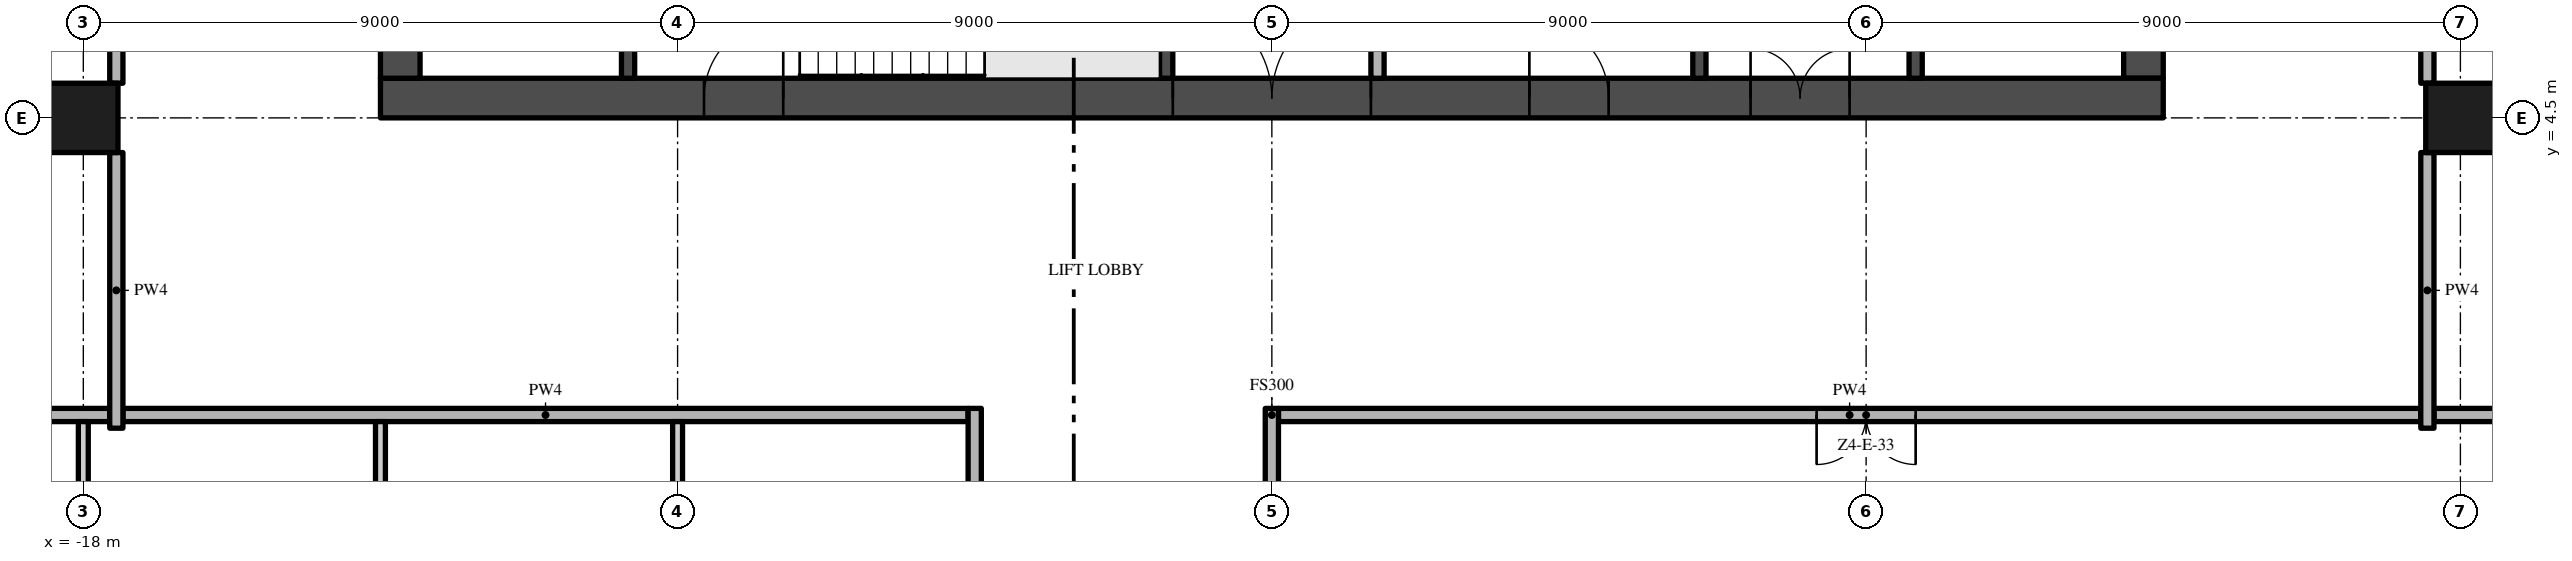
"""IFC4 building model, lengths in metres.
Left out: names, types, materials, properties, quantities, classifications, styles, units other than length and angle.
Written with IfcOpenShell. Run it as: python <this file> out.ifc"""

import sys

from ifc_helpers import new_model, si_unit, direction, frame, frame_2d, origin, origin_2d, place, context, subcontext, project, spatial, rectangle, extrude, element, fill, save


model = new_model("IFC4")
c1 = context("Model", 3, precision=1e-05, world=origin(), true_north=direction((0.0, 1.0)))
c2 = subcontext(c1, "Body", "Model", "MODEL_VIEW")
j1 = project(units=[si_unit("LENGTHUNIT", "METRE"), si_unit("PLANEANGLEUNIT", "RADIAN")], contexts=[c1])
p1 = place(None, origin())
s1 = spatial("IfcSite", under=j1, at=p1, CompositionType="ELEMENT")
p2 = place(p1, origin())
s2 = spatial("IfcBuilding", under=s1, at=p2, CompositionType="ELEMENT")
p3 = place(p2, frame((0.0, 0.0, 230.0)))
s3 = spatial("IfcBuildingStorey", under=s2, at=p3, CompositionType="ELEMENT", Elevation=230.0)
p4 = place(p3, frame((-13.5, 4.8, -0.3), z_axis=(0.0, 0.0, 1.0), x_axis=(1.0, 0.0, 0.0)))
e1 = element("IfcWall", 1, at=p4, inside=s3, PredefinedType="SHEAR", context=c2, shape_type="SweptSolid", body=[
    extrude(rectangle(XDim=27.0, YDim=0.6, at=frame_2d((13.5, 0.0))), origin(), (0.0, 0.0, 1.0), 3.8),
])
p5 = place(p4, frame((12.0, 0.0, 0.3)))
e2 = element("IfcOpeningElement", 2, at=p5, cuts=e1, PredefinedType="OPENING", context=c2, shape_type="SweptSolid", body=[
    extrude(rectangle(XDim=3.0, YDim=2.4, at=frame_2d((1.5, 1.2))), frame((0.0, 0.31, 0.0), z_axis=(0.0, -1.0, 0.0), x_axis=(1.0, 0.0, 0.0)), (0.0, 0.0, 1.0), 0.62),
])
p6 = place(p4, frame((4.9, 0.0, 0.3)))
e3 = element("IfcOpeningElement", 3, at=p6, cuts=e1, PredefinedType="OPENING", context=c2, shape_type="SweptSolid", body=[
    extrude(rectangle(XDim=1.2, YDim=2.2, at=frame_2d((0.6, 1.1))), frame((0.0, 0.31, 0.0), z_axis=(0.0, -1.0, 0.0), x_axis=(1.0, 0.0, 0.0)), (0.0, 0.0, 1.0), 0.62),
])
p7 = place(p4, frame((20.75, 0.0, 0.3)))
e4 = element("IfcOpeningElement", 4, at=p7, cuts=e1, PredefinedType="OPENING", context=c2, shape_type="SweptSolid", body=[
    extrude(rectangle(XDim=1.5, YDim=2.2, at=frame_2d((0.75, 1.1))), frame((0.0, 0.31, 0.0), z_axis=(0.0, -1.0, 0.0), x_axis=(1.0, 0.0, 0.0)), (0.0, 0.0, 1.0), 0.62),
])
p8 = place(p4, frame((17.4, 0.0, 0.3)))
e5 = element("IfcOpeningElement", 5, at=p8, cuts=e1, PredefinedType="OPENING", context=c2, shape_type="SweptSolid", body=[
    extrude(rectangle(XDim=1.2, YDim=2.2, at=frame_2d((0.6, 1.1))), frame((0.0, 0.31, 0.0), z_axis=(0.0, -1.0, 0.0), x_axis=(1.0, 0.0, 0.0)), (0.0, 0.0, 1.0), 0.62),
])
p9 = place(p3, frame((13.2, 5.1, -0.3), z_axis=(0.0, 0.0, 1.0), x_axis=(0.0, 1.0, 0.0)))
e6 = element("IfcWall", 6, at=p9, inside=s3, PredefinedType="SHEAR", context=c2, shape_type="SweptSolid", body=[
    extrude(rectangle(XDim=16.8, YDim=0.6, at=frame_2d((8.4, 0.0))), origin(), (0.0, 0.0, 1.0), 3.8),
])
p10 = place(p9, frame((6.3, 0.0, 0.3)))
e7 = element("IfcOpeningElement", 7, at=p10, cuts=e6, PredefinedType="OPENING", context=c2, shape_type="SweptSolid", body=[
    extrude(rectangle(XDim=1.2, YDim=2.2, at=frame_2d((0.6, 1.1))), frame((0.0, 0.31, 0.0), z_axis=(0.0, -1.0, 0.0), x_axis=(1.0, 0.0, 0.0)), (0.0, 0.0, 1.0), 0.62),
])
p11 = place(p3, frame((-13.2, 21.9, -0.3), z_axis=(0.0, 0.0, 1.0), x_axis=(0.0, -1.0, 0.0)))
e8 = element("IfcWall", 8, at=p11, inside=s3, PredefinedType="SHEAR", context=c2, shape_type="SweptSolid", body=[
    extrude(rectangle(XDim=16.8, YDim=0.6, at=frame_2d((8.4, 0.0))), origin(), (0.0, 0.0, 1.0), 3.8),
])
p12 = place(p11, frame((9.3, 0.0, 0.3)))
e9 = element("IfcOpeningElement", 9, at=p12, cuts=e8, PredefinedType="OPENING", context=c2, shape_type="SweptSolid", body=[
    extrude(rectangle(XDim=1.2, YDim=2.2, at=frame_2d((0.6, 1.1))), frame((0.0, 0.31, 0.0), z_axis=(0.0, -1.0, 0.0), x_axis=(1.0, 0.0, 0.0)), (0.0, 0.0, 1.0), 0.62),
])
for number, where, z_axis, x_axis in (
    (10, (-18.0, 4.5, 0.0), (0.0, 0.0, 1.0), (1.0, 0.0, 0.0)),
    (11, (18.0, 4.5, 0.0), (0.0, 0.0, 1.0), (1.0, 0.0, 0.0)),
):
    element("IfcColumn", number, at=place(p3, frame(where, z_axis=z_axis, x_axis=x_axis)), inside=s3, PredefinedType="COLUMN", context=c2, shape_type="SweptSolid", body=[
        extrude(rectangle(XDim=1.05, YDim=1.05, at=origin_2d()), origin(), (0.0, 0.0, 1.0), 3.5),
    ])
for number, where, z_axis, x_axis in (
    (12, (-9.75, 5.1, 0.0), (0.0, 0.0, 1.0), (0.0, 1.0, 0.0)),
    (13, (-1.6, 5.1, 0.0), (0.0, 0.0, 1.0), (0.0, 1.0, 0.0)),
):
    element("IfcWall", number, at=place(p3, frame(where, z_axis=z_axis, x_axis=x_axis)), inside=s3, PredefinedType="SHEAR", context=c2, shape_type="SweptSolid", body=[
        extrude(rectangle(XDim=2.85, YDim=0.2, at=frame_2d((1.425, 0.0))), origin(), (0.0, 0.0, 1.0), 3.5),
    ])
p13 = place(p3, frame((1.6, 7.5, 0.0), z_axis=(0.0, 0.0, 1.0), x_axis=(0.0, -1.0, 0.0)))
e14 = element("IfcWall", 14, at=p13, inside=s3, PredefinedType="PARTITIONING", context=c2, shape_type="SweptSolid", body=[
    extrude(rectangle(XDim=2.4, YDim=0.2, at=frame_2d((1.2, 0.0))), origin(), (0.0, 0.0, 1.0), 3.5),
])
p14 = place(p13, frame((0.35, 0.0, 0.0)))
e15 = element("IfcOpeningElement", 15, at=p14, cuts=e14, PredefinedType="OPENING", context=c2, shape_type="SweptSolid", body=[
    extrude(rectangle(XDim=0.9, YDim=2.1, at=frame_2d((0.45, 1.05))), frame((0.0, 0.11, 0.0), z_axis=(0.0, -1.0, 0.0), x_axis=(1.0, 0.0, 0.0)), (0.0, 0.0, 1.0), 0.22),
])
p15 = place(p3, frame((6.475, 5.1, 0.0), z_axis=(0.0, 0.0, 1.0), x_axis=(0.0, 1.0, 0.0)))
e16 = element("IfcWall", 16, at=p15, inside=s3, PredefinedType="SHEAR", context=c2, shape_type="SweptSolid", body=[
    extrude(rectangle(XDim=2.4, YDim=0.2, at=frame_2d((1.2, 0.0))), origin(), (0.0, 0.0, 1.0), 3.5),
])
p16 = place(p3, frame((9.75, 5.1, 0.0), z_axis=(0.0, 0.0, 1.0), x_axis=(0.0, 1.0, 0.0)))
e17 = element("IfcWall", 17, at=p16, inside=s3, PredefinedType="SHEAR", context=c2, shape_type="SweptSolid", body=[
    extrude(rectangle(XDim=2.5, YDim=0.2, at=frame_2d((1.25, 0.0))), origin(), (0.0, 0.0, 1.0), 3.5),
])
p17 = place(p16, frame((0.85, 0.0, 0.0)))
e18 = element("IfcOpeningElement", 18, at=p17, cuts=e17, PredefinedType="OPENING", context=c2, shape_type="SweptSolid", body=[
    extrude(rectangle(XDim=1.1, YDim=2.1, at=frame_2d((0.55, 1.05))), frame((0.0, 0.11, 0.0), z_axis=(0.0, -1.0, 0.0), x_axis=(1.0, 0.0, 0.0)), (0.0, 0.0, 1.0), 0.22),
])
p18 = place(p3, frame((-17.4, 0.0, 0.0), z_axis=(0.0, 0.0, 1.0), x_axis=(1.0, 0.0, 0.0)))
e19 = element("IfcWall", 19, at=p18, inside=s3, PredefinedType="PARTITIONING", context=c2, shape_type="SweptSolid", body=[
    extrude(rectangle(XDim=12.8, YDim=0.2, at=frame_2d((6.4, 0.0))), origin(), (0.0, 0.0, 1.0), 3.5),
])
p19 = place(p3, frame((17.4, 0.0, 0.0), z_axis=(0.0, 0.0, 1.0), x_axis=(-1.0, 0.0, 0.0)))
e20 = element("IfcWall", 20, at=p19, inside=s3, PredefinedType="PARTITIONING", context=c2, shape_type="SweptSolid", body=[
    extrude(rectangle(XDim=17.3, YDim=0.2, at=frame_2d((8.65, 0.0))), origin(), (0.0, 0.0, 1.0), 3.5),
])
p20 = place(p19, frame((7.65, 0.0, 0.0)))
e21 = element("IfcOpeningElement", 21, at=p20, cuts=e20, PredefinedType="OPENING", context=c2, shape_type="SweptSolid", body=[
    extrude(rectangle(XDim=1.5, YDim=2.4, at=frame_2d((0.75, 1.2))), frame((0.0, 0.11, 0.0), z_axis=(0.0, -1.0, 0.0), x_axis=(1.0, 0.0, 0.0)), (0.0, 0.0, 1.0), 0.22),
])
for number, where, z_axis, x_axis in (
    (22, (-26.7, 0.0, 0.0), (0.0, 0.0, 1.0), (1.0, 0.0, 0.0)),
    (23, (17.6, 0.0, 0.0), (0.0, 0.0, 1.0), (1.0, 0.0, 0.0)),
):
    element("IfcWall", number, at=place(p3, frame(where, z_axis=z_axis, x_axis=x_axis)), inside=s3, PredefinedType="PARTITIONING", context=c2, shape_type="SweptSolid", body=[
        extrude(rectangle(XDim=9.1, YDim=0.2, at=frame_2d((4.55, 0.0))), origin(), (0.0, 0.0, 1.0), 3.5),
    ])
p21 = place(p3, frame((-18.0, -3.975, 0.0), z_axis=(0.0, 0.0, 1.0), x_axis=(0.0, 1.0, 0.0)))
e24 = element("IfcWall", 24, at=p21, inside=s3, PredefinedType="PARTITIONING", context=c2, shape_type="SweptSolid", body=[
    extrude(rectangle(XDim=3.875, YDim=0.15, at=frame_2d((1.938, 0.0))), origin(), (0.0, 0.0, 1.0), 3.5),
])
p22 = place(p21, frame((0.15, 0.0, 0.0)))
e25 = element("IfcOpeningElement", 25, at=p22, cuts=e24, PredefinedType="OPENING", context=c2, shape_type="SweptSolid", body=[
    extrude(rectangle(XDim=1.0, YDim=2.4, at=frame_2d((0.5, 1.2))), frame((0.0, 0.085, 0.0), z_axis=(0.0, -1.0, 0.0), x_axis=(1.0, 0.0, 0.0)), (0.0, 0.0, 1.0), 0.17),
])
p23 = place(p3, frame((-17.5, -0.2, 0.0), z_axis=(0.0, 0.0, 1.0), x_axis=(0.0, 1.0, 0.0)))
e26 = element("IfcWall", 26, at=p23, inside=s3, PredefinedType="PARTITIONING", context=c2, shape_type="SweptSolid", body=[
    extrude(rectangle(XDim=4.175, YDim=0.2, at=frame_2d((2.087, 0.0))), origin(), (0.0, 0.0, 1.0), 3.5),
])
p24 = place(p3, frame((-17.5, 5.025, 0.0), z_axis=(0.0, 0.0, 1.0), x_axis=(0.0, 1.0, 0.0)))
e27 = element("IfcWall", 27, at=p24, inside=s3, PredefinedType="PARTITIONING", context=c2, shape_type="SweptSolid", body=[
    extrude(rectangle(XDim=7.95, YDim=0.2, at=frame_2d((3.975, 0.0))), origin(), (0.0, 0.0, 1.0), 3.5),
])
p25 = place(p3, frame((-13.5, -0.1, 0.0), z_axis=(0.0, 0.0, 1.0), x_axis=(0.0, -1.0, 0.0)))
e28 = element("IfcWall", 28, at=p25, inside=s3, PredefinedType="PARTITIONING", context=c2, shape_type="SweptSolid", body=[
    extrude(rectangle(XDim=8.525, YDim=0.15, at=frame_2d((4.263, 0.0))), origin(), (0.0, 0.0, 1.0), 3.5),
])
p26 = place(p25, frame((4.0, 0.0, 0.0)))
e29 = element("IfcOpeningElement", 29, at=p26, cuts=e28, PredefinedType="OPENING", context=c2, shape_type="SweptSolid", body=[
    extrude(rectangle(XDim=0.8, YDim=2.0, at=frame_2d((0.4, 1.0))), frame((0.0, 0.085, 0.0), z_axis=(0.0, -1.0, 0.0), x_axis=(1.0, 0.0, 0.0)), (0.0, 0.0, 1.0), 0.17),
])
p27 = place(p3, frame((-9.0, -3.975, 0.0), z_axis=(0.0, 0.0, 1.0), x_axis=(0.0, 1.0, 0.0)))
e30 = element("IfcWall", 30, at=p27, inside=s3, PredefinedType="PARTITIONING", context=c2, shape_type="SweptSolid", body=[
    extrude(rectangle(XDim=3.875, YDim=0.15, at=frame_2d((1.938, 0.0))), origin(), (0.0, 0.0, 1.0), 3.5),
])
p28 = place(p27, frame((2.025, 0.0, 0.0)))
e31 = element("IfcOpeningElement", 31, at=p28, cuts=e30, PredefinedType="OPENING", context=c2, shape_type="SweptSolid", body=[
    extrude(rectangle(XDim=0.9, YDim=2.1, at=frame_2d((0.45, 1.05))), frame((0.0, 0.085, 0.0), z_axis=(0.0, -1.0, 0.0), x_axis=(1.0, 0.0, 0.0)), (0.0, 0.0, 1.0), 0.17),
])
p29 = place(p3, frame((-4.5, -22.2, 0.0), z_axis=(0.0, 0.0, 1.0), x_axis=(0.0, 1.0, 0.0)))
e32 = element("IfcWall", 32, at=p29, inside=s3, PredefinedType="PARTITIONING", context=c2, shape_type="SweptSolid", body=[
    extrude(rectangle(XDim=22.3, YDim=0.2, at=frame_2d((11.15, 0.0))), origin(), (0.0, 0.0, 1.0), 3.5),
])
p30 = place(p29, frame((10.2, 0.0, 0.0)))
e33 = element("IfcOpeningElement", 33, at=p30, cuts=e32, PredefinedType="OPENING", context=c2, shape_type="SweptSolid", body=[
    extrude(rectangle(XDim=1.5, YDim=2.4, at=frame_2d((0.75, 1.2))), frame((0.0, 0.11, 0.0), z_axis=(0.0, -1.0, 0.0), x_axis=(1.0, 0.0, 0.0)), (0.0, 0.0, 1.0), 0.22),
])
p31 = place(p3, frame((0.0, -3.975, 0.0), z_axis=(0.0, 0.0, 1.0), x_axis=(0.0, 1.0, 0.0)))
e34 = element("IfcWall", 34, at=p31, inside=s3, PredefinedType="PARTITIONING", context=c2, shape_type="SweptSolid", body=[
    extrude(rectangle(XDim=4.075, YDim=0.2, at=frame_2d((2.038, 0.0))), origin(), (0.0, 0.0, 1.0), 3.5),
])
p32 = place(p3, frame((17.5, -0.2, 0.0), z_axis=(0.0, 0.0, 1.0), x_axis=(0.0, 1.0, 0.0)))
e35 = element("IfcWall", 35, at=p32, inside=s3, PredefinedType="PARTITIONING", context=c2, shape_type="SweptSolid", body=[
    extrude(rectangle(XDim=4.175, YDim=0.2, at=frame_2d((2.087, 0.0))), origin(), (0.0, 0.0, 1.0), 3.5),
])
p33 = place(p3, frame((17.5, 5.025, 0.0), z_axis=(0.0, 0.0, 1.0), x_axis=(0.0, 1.0, 0.0)))
e36 = element("IfcWall", 36, at=p33, inside=s3, PredefinedType="PARTITIONING", context=c2, shape_type="SweptSolid", body=[
    extrude(rectangle(XDim=7.95, YDim=0.2, at=frame_2d((3.975, 0.0))), origin(), (0.0, 0.0, 1.0), 3.5),
])
p34 = place(p5, frame((3.0, 0.0, 0.0), z_axis=(0.0, 0.0, 1.0), x_axis=(-1.0, 0.0, 0.0)))
e37 = element("IfcDoor", 37, at=p34, inside=s3, OperationType="DOUBLE_DOOR_SINGLE_SWING", PredefinedType="DOOR", context=c2, shape_type="SweptSolid", body=[
    extrude(rectangle(XDim=3.0, YDim=2.4, at=frame_2d((1.5, 1.2))), frame((0.0, 0.025, 0.0), z_axis=(0.0, -1.0, 0.0), x_axis=(1.0, 0.0, 0.0)), (0.0, 0.0, 1.0), 0.05),
])
fill(e2, e37)
p35 = place(p6, frame((1.2, 0.0, 0.0), z_axis=(0.0, 0.0, 1.0), x_axis=(-1.0, 0.0, 0.0)))
e38 = element("IfcDoor", 38, at=p35, inside=s3, OperationType="SINGLE_SWING_LEFT", PredefinedType="DOOR", context=c2, shape_type="SweptSolid", body=[
    extrude(rectangle(XDim=1.2, YDim=2.2, at=frame_2d((0.6, 1.1))), frame((0.0, 0.025, 0.0), z_axis=(0.0, -1.0, 0.0), x_axis=(1.0, 0.0, 0.0)), (0.0, 0.0, 1.0), 0.05),
])
fill(e3, e38)
p36 = place(p7, frame((1.5, 0.0, 0.0), z_axis=(0.0, 0.0, 1.0), x_axis=(-1.0, 0.0, 0.0)))
e39 = element("IfcDoor", 39, at=p36, inside=s3, OperationType="DOUBLE_DOOR_SINGLE_SWING", PredefinedType="DOOR", context=c2, shape_type="SweptSolid", body=[
    extrude(rectangle(XDim=1.5, YDim=2.2, at=frame_2d((0.75, 1.1))), frame((0.0, 0.025, 0.0), z_axis=(0.0, -1.0, 0.0), x_axis=(1.0, 0.0, 0.0)), (0.0, 0.0, 1.0), 0.05),
])
fill(e4, e39)
p37 = place(p8, frame((1.2, 0.0, 0.0), z_axis=(0.0, 0.0, 1.0), x_axis=(-1.0, 0.0, 0.0)))
e40 = element("IfcDoor", 40, at=p37, inside=s3, OperationType="SINGLE_SWING_RIGHT", PredefinedType="DOOR", context=c2, shape_type="SweptSolid", body=[
    extrude(rectangle(XDim=1.2, YDim=2.2, at=frame_2d((0.6, 1.1))), frame((0.0, 0.025, 0.0), z_axis=(0.0, -1.0, 0.0), x_axis=(1.0, 0.0, 0.0)), (0.0, 0.0, 1.0), 0.05),
])
fill(e5, e40)
p38 = place(p20, origin())
e41 = element("IfcDoor", 41, at=p38, inside=s3, OperationType="DOUBLE_DOOR_SINGLE_SWING", PredefinedType="DOOR", context=c2, shape_type="SweptSolid", body=[
    extrude(rectangle(XDim=1.5, YDim=2.4, at=frame_2d((0.75, 1.2))), frame((0.0, 0.025, 0.0), z_axis=(0.0, -1.0, 0.0), x_axis=(1.0, 0.0, 0.0)), (0.0, 0.0, 1.0), 0.05),
])
fill(e21, e41)
save(model, sys.argv[1])
